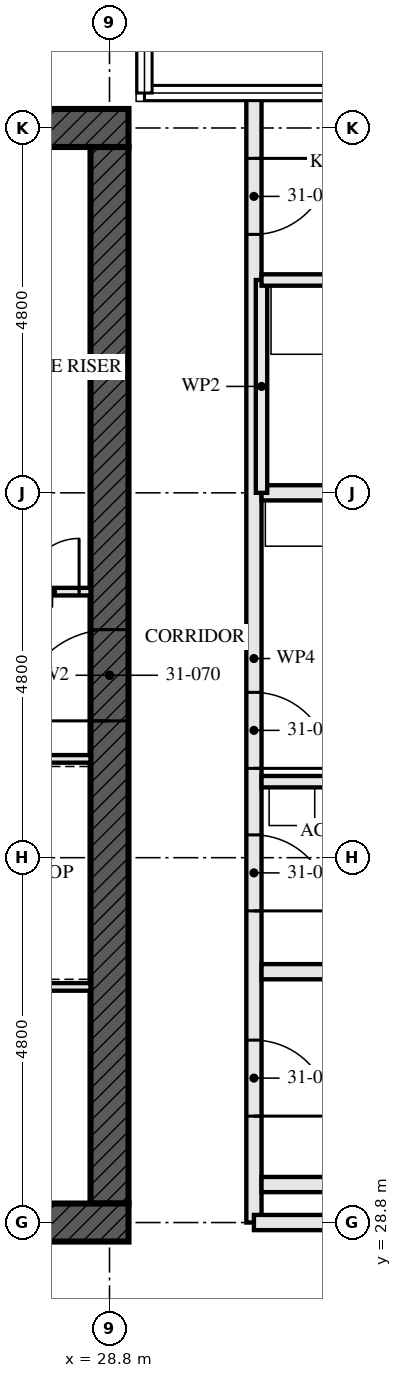
"""IFC4 building model, lengths in metres.
Left out: names, types, materials, properties, quantities, classifications, styles, units other than length and angle.
Written with IfcOpenShell. Run it as: python <this file> out.ifc"""

import sys

from ifc_helpers import new_model, si_unit, direction, frame, frame_2d, origin, place, context, subcontext, project, spatial, rectangle, extrude, element, fill, save


model = new_model("IFC4")
c1 = context("Model", 3, precision=1e-05, world=origin(), true_north=direction((0.0, 1.0)))
c2 = subcontext(c1, "Body", "Model", "MODEL_VIEW")
j1 = project(units=[si_unit("LENGTHUNIT", "METRE"), si_unit("PLANEANGLEUNIT", "RADIAN")], contexts=[c1])
p1 = place(None, origin())
s1 = spatial("IfcSite", under=j1, at=p1, CompositionType="ELEMENT")
p2 = place(p1, origin())
s2 = spatial("IfcBuilding", under=s1, at=p2, CompositionType="ELEMENT")
p3 = place(p2, frame((0.0, 0.0, 115.5)))
s3 = spatial("IfcBuildingStorey", under=s2, at=p3, CompositionType="ELEMENT", Elevation=115.5)
p4 = place(p3, frame((14.15, 28.8, -0.17), z_axis=(0.0, 0.0, 1.0), x_axis=(1.0, 0.0, 0.0)))
e1 = element("IfcWall", 1, at=p4, inside=s3, PredefinedType="SHEAR", context=c2, shape_type="SweptSolid", body=[
    extrude(rectangle(XDim=14.9, YDim=0.5, at=frame_2d((7.45, 0.0))), origin(), (0.0, 0.0, 1.0), 3.5),
])
p5 = place(p4, frame((6.85, 0.0, 0.17)))
e2 = element("IfcOpeningElement", 2, at=p5, cuts=e1, PredefinedType="OPENING", context=c2, shape_type="SweptSolid", body=[
    extrude(rectangle(XDim=1.2, YDim=2.1, at=frame_2d((0.6, 1.05))), frame((0.0, 0.26, 0.0), z_axis=(0.0, -1.0, 0.0), x_axis=(1.0, 0.0, 0.0)), (0.0, 0.0, 1.0), 0.521),
])
p6 = place(p3, frame((29.05, 43.2, -0.17), z_axis=(0.0, 0.0, 1.0), x_axis=(-1.0, 0.0, 0.0)))
e3 = element("IfcWall", 3, at=p6, inside=s3, PredefinedType="SHEAR", context=c2, shape_type="SweptSolid", body=[
    extrude(rectangle(XDim=14.9, YDim=0.5, at=frame_2d((7.45, 0.0))), origin(), (0.0, 0.0, 1.0), 3.5),
])
p7 = place(p6, frame((6.85, 0.0, 0.17)))
e4 = element("IfcOpeningElement", 4, at=p7, cuts=e3, PredefinedType="OPENING", context=c2, shape_type="SweptSolid", body=[
    extrude(rectangle(XDim=1.2, YDim=2.1, at=frame_2d((0.6, 1.05))), frame((0.0, 0.26, 0.0), z_axis=(0.0, -1.0, 0.0), x_axis=(1.0, 0.0, 0.0)), (0.0, 0.0, 1.0), 0.521),
])
p8 = place(p3, frame((28.8, 29.05, -0.17), z_axis=(0.0, 0.0, 1.0), x_axis=(0.0, 1.0, 0.0)))
e5 = element("IfcWall", 5, at=p8, inside=s3, PredefinedType="SHEAR", context=c2, shape_type="SweptSolid", body=[
    extrude(rectangle(XDim=13.9, YDim=0.5, at=frame_2d((6.95, 0.0))), origin(), (0.0, 0.0, 1.0), 3.5),
])
p9 = place(p8, frame((6.35, 0.0, 0.17)))
e6 = element("IfcOpeningElement", 6, at=p9, cuts=e5, PredefinedType="OPENING", context=c2, shape_type="SweptSolid", body=[
    extrude(rectangle(XDim=1.2, YDim=2.1, at=frame_2d((0.6, 1.05))), frame((0.0, 0.26, 0.0), z_axis=(0.0, -1.0, 0.0), x_axis=(1.0, 0.0, 0.0)), (0.0, 0.0, 1.0), 0.521),
])
for number, where, z_axis, x_axis in (
    (7, (35.5, 29.3, 0.0), (0.0, 0.0, 1.0), (-1.0, 0.0, 0.0)),
    (8, (35.5, 32.1, 0.0), (0.0, 0.0, 1.0), (-1.0, 0.0, 0.0)),
):
    element("IfcWall", number, at=place(p3, frame(where, z_axis=z_axis, x_axis=x_axis)), inside=s3, PredefinedType="SOLIDWALL", context=c2, shape_type="SweptSolid", body=[
        extrude(rectangle(XDim=4.7, YDim=0.2, at=frame_2d((2.35, 0.0))), origin(), (0.0, 0.0, 1.0), 2.99),
    ])
p10 = place(p3, frame((33.8, 34.6, 0.0), z_axis=(0.0, 0.0, 1.0), x_axis=(-1.0, 0.0, 0.0)))
e9 = element("IfcWall", 9, at=p10, inside=s3, PredefinedType="PARTITIONING", context=c2, shape_type="SweptSolid", body=[
    extrude(rectangle(XDim=3.0, YDim=0.15, at=frame_2d((1.5, 0.0))), origin(), (0.0, 0.0, 1.0), 3.33),
])
p11 = place(p3, frame((38.08, 38.4, 0.0), z_axis=(0.0, 0.0, 1.0), x_axis=(-1.0, 0.0, 0.0)))
e10 = element("IfcWall", 10, at=p11, inside=s3, PredefinedType="PARTITIONING", context=c2, shape_type="SweptSolid", body=[
    extrude(rectangle(XDim=7.28, YDim=0.2, at=frame_2d((3.64, 0.0))), origin(), (0.0, 0.0, 1.0), 2.55),
])
p12 = place(p3, frame((33.8, 41.2, 0.0), z_axis=(0.0, 0.0, 1.0), x_axis=(-1.0, 0.0, 0.0)))
e11 = element("IfcWall", 11, at=p12, inside=s3, PredefinedType="PARTITIONING", context=c2, shape_type="SweptSolid", body=[
    extrude(rectangle(XDim=3.0, YDim=0.15, at=frame_2d((1.5, 0.0))), origin(), (0.0, 0.0, 1.0), 3.33),
])
p13 = place(p3, frame((30.8, 38.4, 0.0), z_axis=(0.0, 0.0, 1.0), x_axis=(0.0, 1.0, 0.0)))
e12 = element("IfcWall", 12, at=p13, inside=s3, PredefinedType="PARTITIONING", context=c2, shape_type="SweptSolid", body=[
    extrude(rectangle(XDim=2.8, YDim=0.15, at=frame_2d((1.4, 0.0))), origin(), (0.0, 0.0, 1.0), 3.33),
])
p14 = place(p3, frame((30.7, 28.8, 0.0), z_axis=(0.0, 0.0, 1.0), x_axis=(0.0, 1.0, 0.0)))
e13 = element("IfcWall", 13, at=p14, inside=s3, PredefinedType="PARTITIONING", context=c2, shape_type="SweptSolid", body=[
    extrude(rectangle(XDim=14.84, YDim=0.2, at=frame_2d((7.42, 0.0))), origin(), (0.0, 0.0, 1.0), 2.32),
])
p15 = place(p14, frame((1.4, 0.0, 0.0)))
e14 = element("IfcOpeningElement", 14, at=p15, cuts=e13, PredefinedType="OPENING", context=c2, shape_type="SweptSolid", body=[
    extrude(rectangle(XDim=1.0, YDim=2.1, at=frame_2d((0.5, 1.05))), frame((0.0, 0.111, 0.0), z_axis=(0.0, -1.0, 0.0), x_axis=(1.0, 0.0, 0.0)), (0.0, 0.0, 1.0), 0.221),
])
p16 = place(p14, frame((4.1, 0.0, 0.0)))
e15 = element("IfcOpeningElement", 15, at=p16, cuts=e13, PredefinedType="OPENING", context=c2, shape_type="SweptSolid", body=[
    extrude(rectangle(XDim=1.0, YDim=2.1, at=frame_2d((0.5, 1.05))), frame((0.0, 0.111, 0.0), z_axis=(0.0, -1.0, 0.0), x_axis=(1.0, 0.0, 0.0)), (0.0, 0.0, 1.0), 0.221),
])
p17 = place(p14, frame((5.975, 0.0, 0.0)))
e16 = element("IfcOpeningElement", 16, at=p17, cuts=e13, PredefinedType="OPENING", context=c2, shape_type="SweptSolid", body=[
    extrude(rectangle(XDim=1.0, YDim=2.1, at=frame_2d((0.5, 1.05))), frame((0.0, 0.111, 0.0), z_axis=(0.0, -1.0, 0.0), x_axis=(1.0, 0.0, 0.0)), (0.0, 0.0, 1.0), 0.221),
])
p18 = place(p14, frame((13.0, 0.0, 0.0)))
e17 = element("IfcOpeningElement", 17, at=p18, cuts=e13, PredefinedType="OPENING", context=c2, shape_type="SweptSolid", body=[
    extrude(rectangle(XDim=1.0, YDim=2.1, at=frame_2d((0.5, 1.05))), frame((0.0, 0.111, 0.0), z_axis=(0.0, -1.0, 0.0), x_axis=(1.0, 0.0, 0.0)), (0.0, 0.0, 1.0), 0.221),
])
p19 = place(p3, frame((23.05, 34.9, 0.0), z_axis=(0.0, 0.0, 1.0), x_axis=(1.0, 0.0, 0.0)))
e18 = element("IfcWall", 18, at=p19, inside=s3, PredefinedType="SOLIDWALL", context=c2, shape_type="SweptSolid", body=[
    extrude(rectangle(XDim=5.5, YDim=0.1, at=frame_2d((2.75, 0.0))), origin(), (0.0, 0.0, 1.0), 3.33),
])
p20 = place(p3, frame((22.65, 37.1, 0.0), z_axis=(0.0, 0.0, 1.0), x_axis=(1.0, 0.0, 0.0)))
e19 = element("IfcWall", 19, at=p20, inside=s3, PredefinedType="SOLIDWALL", context=c2, shape_type="SweptSolid", body=[
    extrude(rectangle(XDim=5.9, YDim=0.1, at=frame_2d((2.95, 0.0))), origin(), (0.0, 0.0, 1.0), 3.33),
])
p21 = place(p20, frame((3.5, 0.0, 0.0)))
e20 = element("IfcOpeningElement", 20, at=p21, cuts=e19, PredefinedType="OPENING", context=c2, shape_type="SweptSolid", body=[
    extrude(rectangle(XDim=0.9, YDim=2.1, at=frame_2d((0.45, 1.05))), frame((0.0, 0.061, 0.0), z_axis=(0.0, -1.0, 0.0), x_axis=(1.0, 0.0, 0.0)), (0.0, 0.0, 1.0), 0.121),
])
p22 = place(p20, frame((5.05, 0.0, 0.0)))
e21 = element("IfcOpeningElement", 21, at=p22, cuts=e19, PredefinedType="OPENING", context=c2, shape_type="SweptSolid", body=[
    extrude(rectangle(XDim=0.7, YDim=2.1, at=frame_2d((0.35, 1.05))), frame((0.0, 0.061, 0.0), z_axis=(0.0, -1.0, 0.0), x_axis=(1.0, 0.0, 0.0)), (0.0, 0.0, 1.0), 0.121),
])
p23 = place(p3, frame((23.15, 31.9, 0.0), z_axis=(0.0, 0.0, 1.0), x_axis=(1.0, 0.0, 0.0)))
e22 = element("IfcWall", 22, at=p23, inside=s3, PredefinedType="SOLIDWALL", context=c2, shape_type="SweptSolid", body=[
    extrude(rectangle(XDim=5.4, YDim=0.1, at=frame_2d((2.7, 0.0))), origin(), (0.0, 0.0, 1.0), 3.33),
])
p24 = place(p3, frame((33.295, 28.8, 0.0), z_axis=(0.0, 0.0, 1.0), x_axis=(-1.0, 0.0, 0.0)))
e23 = element("IfcWall", 23, at=p24, inside=s3, PredefinedType="PARTITIONING", context=c2, shape_type="SweptSolid", body=[
    extrude(rectangle(XDim=2.595, YDim=0.2, at=frame_2d((1.298, 0.0))), origin(), (0.0, 0.0, 1.0), 2.32),
])
p25 = place(p15, frame((1.0, 0.0, 0.0), z_axis=(0.0, 0.0, 1.0), x_axis=(-1.0, 0.0, 0.0)))
e24 = element("IfcDoor", 24, at=p25, inside=s3, OperationType="SINGLE_SWING_LEFT", PredefinedType="DOOR", context=c2, shape_type="SweptSolid", body=[
    extrude(rectangle(XDim=1.0, YDim=2.1, at=frame_2d((0.5, 1.05))), frame((0.0, 0.032, 0.0), z_axis=(0.0, -1.0, 0.0), x_axis=(1.0, 0.0, 0.0)), (0.0, 0.0, 1.0), 0.064),
])
fill(e14, e24)
p26 = place(p16, frame((1.0, 0.0, 0.0), z_axis=(0.0, 0.0, 1.0), x_axis=(-1.0, 0.0, 0.0)))
e25 = element("IfcDoor", 25, at=p26, inside=s3, OperationType="SINGLE_SWING_LEFT", PredefinedType="DOOR", context=c2, shape_type="SweptSolid", body=[
    extrude(rectangle(XDim=1.0, YDim=2.1, at=frame_2d((0.5, 1.05))), frame((0.0, 0.027, 0.0), z_axis=(0.0, -1.0, 0.0), x_axis=(1.0, 0.0, 0.0)), (0.0, 0.0, 1.0), 0.054),
])
fill(e15, e25)
p27 = place(p17, frame((1.0, 0.0, 0.0), z_axis=(0.0, 0.0, 1.0), x_axis=(-1.0, 0.0, 0.0)))
e26 = element("IfcDoor", 26, at=p27, inside=s3, OperationType="SINGLE_SWING_LEFT", PredefinedType="DOOR", context=c2, shape_type="SweptSolid", body=[
    extrude(rectangle(XDim=1.0, YDim=2.1, at=frame_2d((0.5, 1.05))), frame((0.0, 0.027, 0.0), z_axis=(0.0, -1.0, 0.0), x_axis=(1.0, 0.0, 0.0)), (0.0, 0.0, 1.0), 0.054),
])
fill(e16, e26)
p28 = place(p18, frame((1.0, 0.0, 0.0), z_axis=(0.0, 0.0, 1.0), x_axis=(-1.0, 0.0, 0.0)))
e27 = element("IfcDoor", 27, at=p28, inside=s3, OperationType="SINGLE_SWING_RIGHT", PredefinedType="DOOR", context=c2, shape_type="SweptSolid", body=[
    extrude(rectangle(XDim=1.0, YDim=2.1, at=frame_2d((0.5, 1.05))), frame((0.0, 0.027, 0.0), z_axis=(0.0, -1.0, 0.0), x_axis=(1.0, 0.0, 0.0)), (0.0, 0.0, 1.0), 0.054),
])
fill(e17, e27)
p29 = place(p22, origin())
e28 = element("IfcDoor", 28, at=p29, inside=s3, OperationType="SINGLE_SWING_LEFT", PredefinedType="DOOR", context=c2, shape_type="SweptSolid", body=[
    extrude(rectangle(XDim=0.7, YDim=2.1, at=frame_2d((0.35, 1.05))), frame((0.0, 0.027, 0.0), z_axis=(0.0, -1.0, 0.0), x_axis=(1.0, 0.0, 0.0)), (0.0, 0.0, 1.0), 0.054),
])
fill(e21, e28)
p30 = place(p9, origin())
e29 = element("IfcDoor", 29, at=p30, inside=s3, OperationType="SINGLE_SWING_LEFT", PredefinedType="DOOR", context=c2, shape_type="SweptSolid", body=[
    extrude(rectangle(XDim=1.2, YDim=2.1, at=frame_2d((0.6, 1.05))), frame((0.0, 0.027, 0.0), z_axis=(0.0, -1.0, 0.0), x_axis=(1.0, 0.0, 0.0)), (0.0, 0.0, 1.0), 0.054),
])
fill(e6, e29)
save(model, sys.argv[1])
